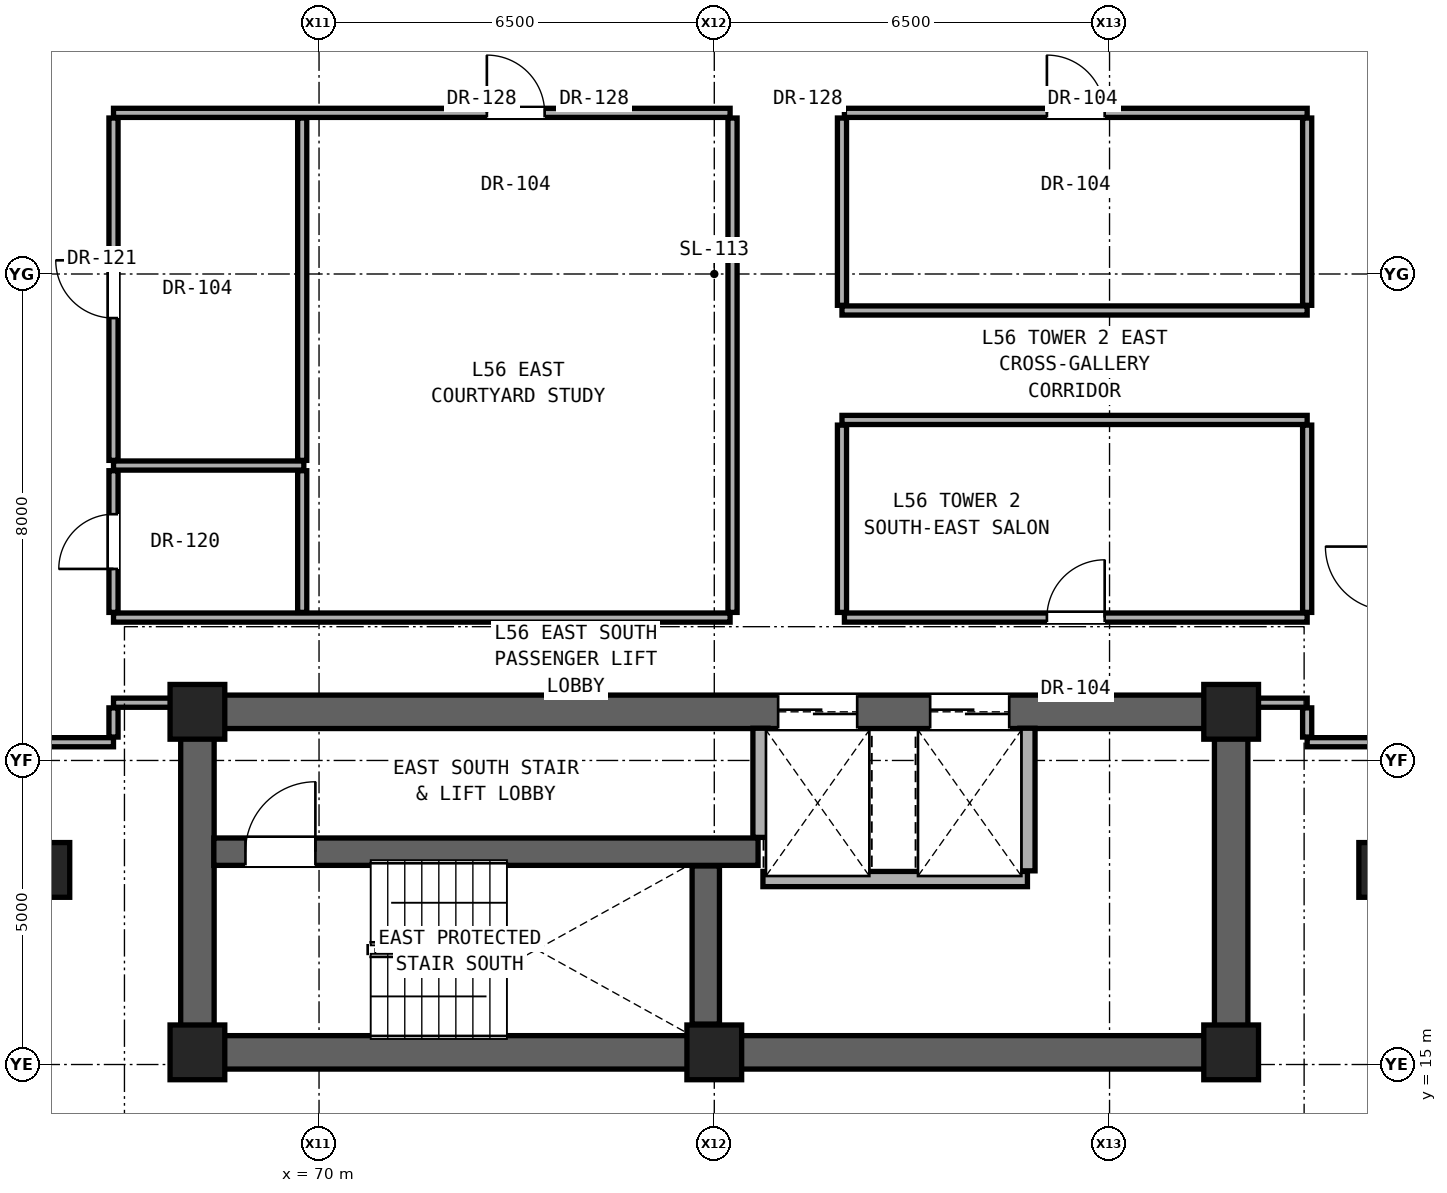
"""IFC4 building model, lengths in metres.
Left out: names, types, materials, properties, quantities, classifications, styles, units other than length and angle.
Written with IfcOpenShell. Run it as: python <this file> out.ifc"""

import sys

from ifc_helpers import new_model, si_unit, direction, frame, frame_2d, origin, origin_2d, place, context, subcontext, project, spatial, rectangle, extrude, element, fill, save


model = new_model("IFC4")
c1 = context("Model", 3, precision=1e-05, world=origin(), true_north=direction((0.0, 1.0)))
c2 = subcontext(c1, "Body", "Model", "MODEL_VIEW")
j1 = project(units=[si_unit("LENGTHUNIT", "METRE"), si_unit("PLANEANGLEUNIT", "RADIAN")], contexts=[c1])
p1 = place(None, origin())
s1 = spatial("IfcSite", under=j1, at=p1, CompositionType="ELEMENT")
p2 = place(p1, origin())
s2 = spatial("IfcBuilding", under=s1, at=p2, CompositionType="ELEMENT")
p3 = place(p2, frame((0.0, 0.0, 196.65)))
s3 = spatial("IfcBuildingStorey", under=s2, at=p3, CompositionType="ELEMENT", Elevation=196.65)
for number, where, z_axis, x_axis in (
    (1, (68.0, 15.2, 0.0), (0.0, 0.0, 1.0), (1.0, 0.0, 0.0)),
    (2, (76.5, 15.2, 0.0), (0.0, 0.0, 1.0), (1.0, 0.0, 0.0)),
    (3, (85.0, 15.2, 0.0), (0.0, 0.0, 1.0), (1.0, 0.0, 0.0)),
    (4, (68.0, 20.8, 0.0), (0.0, 0.0, 1.0), (1.0, 0.0, 0.0)),
    (5, (85.0, 20.8, 0.0), (0.0, 0.0, 1.0), (1.0, 0.0, 0.0)),
):
    element("IfcColumn", number, at=place(p3, frame(where, z_axis=z_axis, x_axis=x_axis)), inside=s3, PredefinedType="COLUMN", context=c2, shape_type="SweptSolid", body=[
        extrude(rectangle(XDim=0.9, YDim=0.9, at=origin_2d()), origin(), (0.0, 0.0, 1.0), 3.25),
    ])
for number, where, z_axis, x_axis in (
    (6, (65.6, 18.2, 0.0), (0.0, 0.0, 1.0), (1.0, 0.0, 0.0)),
    (7, (87.4, 18.2, 0.0), (0.0, 0.0, 1.0), (1.0, 0.0, 0.0)),
):
    element("IfcColumn", number, at=place(p3, frame(where, z_axis=z_axis, x_axis=x_axis)), inside=s3, PredefinedType="PILASTER", context=c2, shape_type="SweptSolid", body=[
        extrude(rectangle(XDim=0.6, YDim=0.9, at=origin_2d()), origin(), (0.0, 0.0, 1.0), 3.25),
    ])
p4 = place(p3, frame((68.0, 15.2, 0.0), z_axis=(0.0, 0.0, 1.0), x_axis=(1.0, 0.0, 0.0)))
e8 = element("IfcWall", 8, at=p4, inside=s3, PredefinedType="SHEAR", context=c2, shape_type="SweptSolid", body=[
    extrude(rectangle(XDim=17.0, YDim=0.55, at=frame_2d((8.5, 0.0))), origin(), (0.0, 0.0, 1.0), 3.05),
])
for number, where, z_axis, x_axis in (
    (9, (68.0, 15.2, 0.0), (0.0, 0.0, 1.0), (0.0, 1.0, 0.0)),
    (10, (85.0, 15.2, 0.0), (0.0, 0.0, 1.0), (0.0, 1.0, 0.0)),
):
    element("IfcWall", number, at=place(p3, frame(where, z_axis=z_axis, x_axis=x_axis)), inside=s3, PredefinedType="SHEAR", context=c2, shape_type="SweptSolid", body=[
        extrude(rectangle(XDim=5.6, YDim=0.55, at=frame_2d((2.8, 0.0))), origin(), (0.0, 0.0, 1.0), 3.05),
    ])
p5 = place(p3, frame((68.0, 20.8, 0.0), z_axis=(0.0, 0.0, 1.0), x_axis=(1.0, 0.0, 0.0)))
e11 = element("IfcWall", 11, at=p5, inside=s3, PredefinedType="SHEAR", context=c2, shape_type="SweptSolid", body=[
    extrude(rectangle(XDim=17.0, YDim=0.55, at=frame_2d((8.5, 0.0))), origin(), (0.0, 0.0, 1.0), 3.05),
])
p6 = place(p5, frame((9.55, 0.0, 0.0)))
e12 = element("IfcOpeningElement", 12, at=p6, cuts=e11, PredefinedType="OPENING", context=c2, shape_type="SweptSolid", body=[
    extrude(rectangle(XDim=1.3, YDim=2.3, at=frame_2d((0.65, 1.15))), frame((0.0, 0.285, 0.0), z_axis=(0.0, -1.0, 0.0), x_axis=(1.0, 0.0, 0.0)), (0.0, 0.0, 1.0), 0.57),
])
p7 = place(p5, frame((12.05, 0.0, 0.0)))
e13 = element("IfcOpeningElement", 13, at=p7, cuts=e11, PredefinedType="OPENING", context=c2, shape_type="SweptSolid", body=[
    extrude(rectangle(XDim=1.3, YDim=2.3, at=frame_2d((0.65, 1.15))), frame((0.0, 0.285, 0.0), z_axis=(0.0, -1.0, 0.0), x_axis=(1.0, 0.0, 0.0)), (0.0, 0.0, 1.0), 0.57),
])
p8 = place(p3, frame((77.3, 18.05, 0.0), z_axis=(0.0, 0.0, 1.0), x_axis=(1.0, 0.0, 0.0)))
e14 = element("IfcWall", 14, at=p8, inside=s3, PredefinedType="SOLIDWALL", context=c2, shape_type="SweptSolid", body=[
    extrude(rectangle(XDim=4.35, YDim=0.25, at=frame_2d((2.175, 0.0))), origin(), (0.0, 0.0, 1.0), 3.05),
])
p9 = place(p3, frame((68.27, 18.5, 0.0), z_axis=(0.0, 0.0, 1.0), x_axis=(1.0, 0.0, 0.0)))
e15 = element("IfcWall", 15, at=p9, inside=s3, PredefinedType="SHEAR", context=c2, shape_type="SweptSolid", body=[
    extrude(rectangle(XDim=8.95, YDim=0.45, at=frame_2d((4.475, 0.0))), origin(), (0.0, 0.0, 1.0), 3.05),
])
p10 = place(p9, frame((0.52, 0.0, 0.0)))
e16 = element("IfcOpeningElement", 16, at=p10, cuts=e15, PredefinedType="OPENING", context=c2, shape_type="SweptSolid", body=[
    extrude(rectangle(XDim=1.15, YDim=2.2, at=frame_2d((0.575, 1.1))), frame((0.0, 0.235, 0.0), z_axis=(0.0, -1.0, 0.0), x_axis=(1.0, 0.0, 0.0)), (0.0, 0.0, 1.0), 0.47),
])
p11 = place(p3, frame((65.25, 20.3, 0.0), z_axis=(0.0, 0.0, 1.0), x_axis=(1.0, 0.0, 0.0)))
e17 = element("IfcWall", 17, at=p11, inside=s3, PredefinedType="PARTITIONING", context=c2, shape_type="SweptSolid", body=[
    extrude(rectangle(XDim=1.37, YDim=0.15, at=frame_2d((0.685, 0.0))), origin(), (0.0, 0.0, 1.0), 3.05),
])
p12 = place(p3, frame((86.25, 20.3, 0.0), z_axis=(0.0, 0.0, 1.0), x_axis=(1.0, 0.0, 0.0)))
e18 = element("IfcWall", 18, at=p12, inside=s3, PredefinedType="PARTITIONING", context=c2, shape_type="SweptSolid", body=[
    extrude(rectangle(XDim=1.35, YDim=0.15, at=frame_2d((0.675, 0.0))), origin(), (0.0, 0.0, 1.0), 3.05),
])
p13 = place(p3, frame((66.62, 20.95, 0.0), z_axis=(0.0, 0.0, 1.0), x_axis=(1.0, 0.0, 0.0)))
e19 = element("IfcWall", 19, at=p13, inside=s3, PredefinedType="PARTITIONING", context=c2, shape_type="SweptSolid", body=[
    extrude(rectangle(XDim=1.11, YDim=0.15, at=frame_2d((0.555, 0.0))), origin(), (0.0, 0.0, 1.0), 2.442),
])
p14 = place(p3, frame((85.27, 20.95, 0.0), z_axis=(0.0, 0.0, 1.0), x_axis=(1.0, 0.0, 0.0)))
e20 = element("IfcWall", 20, at=p14, inside=s3, PredefinedType="PARTITIONING", context=c2, shape_type="SweptSolid", body=[
    extrude(rectangle(XDim=0.98, YDim=0.15, at=frame_2d((0.49, 0.0))), origin(), (0.0, 0.0, 1.0), 2.442),
])
p15 = place(p3, frame((66.62, 22.35, 0.0), z_axis=(0.0, 0.0, 1.0), x_axis=(1.0, 0.0, 0.0)))
e21 = element("IfcWall", 21, at=p15, inside=s3, PredefinedType="PARTITIONING", context=c2, shape_type="SweptSolid", body=[
    extrude(rectangle(XDim=10.14, YDim=0.15, at=frame_2d((5.07, 0.0))), origin(), (0.0, 0.0, 1.0), 2.186),
])
p16 = place(p3, frame((78.64, 22.35, 0.0), z_axis=(0.0, 0.0, 1.0), x_axis=(1.0, 0.0, 0.0)))
e22 = element("IfcWall", 22, at=p16, inside=s3, PredefinedType="PARTITIONING", context=c2, shape_type="SweptSolid", body=[
    extrude(rectangle(XDim=7.61, YDim=0.15, at=frame_2d((3.805, 0.0))), origin(), (0.0, 0.0, 1.0), 2.186),
])
p17 = place(p16, frame((3.33, 0.0, 0.0)))
e23 = element("IfcOpeningElement", 23, at=p17, cuts=e22, PredefinedType="OPENING", context=c2, shape_type="SweptSolid", body=[
    extrude(rectangle(XDim=0.95, YDim=2.15, at=frame_2d((0.475, 1.075))), frame((0.0, 0.085, 0.0), z_axis=(0.0, -1.0, 0.0), x_axis=(1.0, 0.0, 0.0)), (0.0, 0.0, 1.0), 0.17),
])
p18 = place(p3, frame((66.62, 24.85, 0.0), z_axis=(0.0, 0.0, 1.0), x_axis=(1.0, 0.0, 0.0)))
e24 = element("IfcWall", 24, at=p18, inside=s3, PredefinedType="PARTITIONING", context=c2, shape_type="SweptSolid", body=[
    extrude(rectangle(XDim=3.13, YDim=0.15, at=frame_2d((1.565, 0.0))), origin(), (0.0, 0.0, 1.0), 2.186),
])
for number, where, z_axis, x_axis in (
    (25, (78.6, 25.6, 0.0), (0.0, 0.0, 1.0), (1.0, 0.0, 0.0)),
    (26, (78.6, 27.4, 0.0), (0.0, 0.0, 1.0), (1.0, 0.0, 0.0)),
):
    element("IfcWall", number, at=place(p3, frame(where, z_axis=z_axis, x_axis=x_axis)), inside=s3, PredefinedType="PARTITIONING", context=c2, shape_type="SweptSolid", body=[
        extrude(rectangle(XDim=7.65, YDim=0.15, at=frame_2d((3.825, 0.0))), origin(), (0.0, 0.0, 1.0), 2.186),
    ])
p19 = place(p3, frame((66.62, 30.65, 0.0), z_axis=(0.0, 0.0, 1.0), x_axis=(1.0, 0.0, 0.0)))
e27 = element("IfcWall", 27, at=p19, inside=s3, PredefinedType="PARTITIONING", context=c2, shape_type="SweptSolid", body=[
    extrude(rectangle(XDim=10.14, YDim=0.15, at=frame_2d((5.07, 0.0))), origin(), (0.0, 0.0, 1.0), 2.186),
])
p20 = place(p19, frame((6.14, 0.0, 0.0)))
e28 = element("IfcOpeningElement", 28, at=p20, cuts=e27, PredefinedType="OPENING", context=c2, shape_type="SweptSolid", body=[
    extrude(rectangle(XDim=0.95, YDim=2.15, at=frame_2d((0.475, 1.075))), frame((0.0, 0.085, 0.0), z_axis=(0.0, -1.0, 0.0), x_axis=(1.0, 0.0, 0.0)), (0.0, 0.0, 1.0), 0.17),
])
p21 = place(p3, frame((78.64, 30.65, 0.0), z_axis=(0.0, 0.0, 1.0), x_axis=(1.0, 0.0, 0.0)))
e29 = element("IfcWall", 29, at=p21, inside=s3, PredefinedType="PARTITIONING", context=c2, shape_type="SweptSolid", body=[
    extrude(rectangle(XDim=7.61, YDim=0.15, at=frame_2d((3.805, 0.0))), origin(), (0.0, 0.0, 1.0), 2.186),
])
p22 = place(p21, frame((3.33, 0.0, 0.0)))
e30 = element("IfcOpeningElement", 30, at=p22, cuts=e29, PredefinedType="OPENING", context=c2, shape_type="SweptSolid", body=[
    extrude(rectangle(XDim=0.95, YDim=2.15, at=frame_2d((0.475, 1.075))), frame((0.0, 0.085, 0.0), z_axis=(0.0, -1.0, 0.0), x_axis=(1.0, 0.0, 0.0)), (0.0, 0.0, 1.0), 0.17),
])
p23 = place(p3, frame((66.62, 20.385, 0.0), z_axis=(0.0, 0.0, 1.0), x_axis=(0.0, 1.0, 0.0)))
e31 = element("IfcWall", 31, at=p23, inside=s3, PredefinedType="PARTITIONING", context=c2, shape_type="SweptSolid", body=[
    extrude(rectangle(XDim=0.48, YDim=0.15, at=frame_2d((0.24, 0.0))), origin(), (0.0, 0.0, 1.0), 2.442),
])
p24 = place(p3, frame((66.62, 22.435, 0.0), z_axis=(0.0, 0.0, 1.0), x_axis=(0.0, 1.0, 0.0)))
e32 = element("IfcWall", 32, at=p24, inside=s3, PredefinedType="PARTITIONING", context=c2, shape_type="SweptSolid", body=[
    extrude(rectangle(XDim=2.33, YDim=0.15, at=frame_2d((1.165, 0.0))), origin(), (0.0, 0.0, 1.0), 3.05),
])
p25 = place(p24, frame((0.715, 0.0, 0.0)))
e33 = element("IfcOpeningElement", 33, at=p25, cuts=e32, PredefinedType="OPENING", context=c2, shape_type="SweptSolid", body=[
    extrude(rectangle(XDim=0.9, YDim=2.1, at=frame_2d((0.45, 1.05))), frame((0.0, 0.085, 0.0), z_axis=(0.0, -1.0, 0.0), x_axis=(1.0, 0.0, 0.0)), (0.0, 0.0, 1.0), 0.17),
])
p26 = place(p3, frame((66.62, 24.935, 0.0), z_axis=(0.0, 0.0, 1.0), x_axis=(0.0, 1.0, 0.0)))
e34 = element("IfcWall", 34, at=p26, inside=s3, PredefinedType="PARTITIONING", context=c2, shape_type="SweptSolid", body=[
    extrude(rectangle(XDim=5.63, YDim=0.15, at=frame_2d((2.815, 0.0))), origin(), (0.0, 0.0, 1.0), 2.346),
])
p27 = place(p26, frame((2.34, 0.0, 0.0)))
e35 = element("IfcOpeningElement", 35, at=p27, cuts=e34, PredefinedType="OPENING", context=c2, shape_type="SweptSolid", body=[
    extrude(rectangle(XDim=0.95, YDim=2.15, at=frame_2d((0.475, 1.075))), frame((0.0, 0.085, 0.0), z_axis=(0.0, -1.0, 0.0), x_axis=(1.0, 0.0, 0.0)), (0.0, 0.0, 1.0), 0.17),
])
p28 = place(p3, frame((69.723, 22.435, 0.0), z_axis=(0.0, 0.0, 1.0), x_axis=(0.0, 1.0, 0.0)))
e36 = element("IfcWall", 36, at=p28, inside=s3, PredefinedType="PARTITIONING", context=c2, shape_type="SweptSolid", body=[
    extrude(rectangle(XDim=2.33, YDim=0.15, at=frame_2d((1.165, 0.0))), origin(), (0.0, 0.0, 1.0), 3.05),
])
p29 = place(p3, frame((69.723, 24.935, 0.0), z_axis=(0.0, 0.0, 1.0), x_axis=(0.0, 1.0, 0.0)))
e37 = element("IfcWall", 37, at=p29, inside=s3, PredefinedType="PARTITIONING", context=c2, shape_type="SweptSolid", body=[
    extrude(rectangle(XDim=5.63, YDim=0.15, at=frame_2d((2.815, 0.0))), origin(), (0.0, 0.0, 1.0), 2.186),
])
p30 = place(p3, frame((76.36, 15.665, 0.0), z_axis=(0.0, 0.0, 1.0), x_axis=(0.0, 1.0, 0.0)))
e38 = element("IfcWall", 38, at=p30, inside=s3, PredefinedType="SHEAR", context=c2, shape_type="SweptSolid", body=[
    extrude(rectangle(XDim=2.6, YDim=0.45, at=frame_2d((1.3, 0.0))), origin(), (0.0, 0.0, 1.0), 3.05),
])
p31 = place(p3, frame((76.8, 22.435, 0.0), z_axis=(0.0, 0.0, 1.0), x_axis=(0.0, 1.0, 0.0)))
e39 = element("IfcWall", 39, at=p31, inside=s3, PredefinedType="PARTITIONING", context=c2, shape_type="SweptSolid", body=[
    extrude(rectangle(XDim=8.13, YDim=0.15, at=frame_2d((4.065, 0.0))), origin(), (0.0, 0.0, 1.0), 2.186),
])
p32 = place(p3, frame((77.26, 18.735, 0.0), z_axis=(0.0, 0.0, 1.0), x_axis=(0.0, 1.0, 0.0)))
e40 = element("IfcWall", 40, at=p32, inside=s3, PredefinedType="SOLIDWALL", context=c2, shape_type="SweptSolid", body=[
    extrude(rectangle(XDim=1.795, YDim=0.25, at=frame_2d((0.897, 0.0))), origin(), (0.0, 0.0, 1.0), 3.05),
])
p33 = place(p3, frame((78.6, 22.435, 0.0), z_axis=(0.0, 0.0, 1.0), x_axis=(0.0, 1.0, 0.0)))
e41 = element("IfcWall", 41, at=p33, inside=s3, PredefinedType="PARTITIONING", context=c2, shape_type="SweptSolid", body=[
    extrude(rectangle(XDim=3.08, YDim=0.15, at=frame_2d((1.54, 0.0))), origin(), (0.0, 0.0, 1.0), 3.05),
])
p34 = place(p3, frame((78.6, 27.485, 0.0), z_axis=(0.0, 0.0, 1.0), x_axis=(0.0, 1.0, 0.0)))
e42 = element("IfcWall", 42, at=p34, inside=s3, PredefinedType="PARTITIONING", context=c2, shape_type="SweptSolid", body=[
    extrude(rectangle(XDim=3.08, YDim=0.15, at=frame_2d((1.54, 0.0))), origin(), (0.0, 0.0, 1.0), 2.186),
])
p35 = place(p3, frame((81.65, 18.185, 0.0), z_axis=(0.0, 0.0, 1.0), x_axis=(0.0, 1.0, 0.0)))
e43 = element("IfcWall", 43, at=p35, inside=s3, PredefinedType="SOLIDWALL", context=c2, shape_type="SweptSolid", body=[
    extrude(rectangle(XDim=2.345, YDim=0.25, at=frame_2d((1.172, 0.0))), origin(), (0.0, 0.0, 1.0), 3.05),
])
p36 = place(p3, frame((86.25, 20.385, 0.0), z_axis=(0.0, 0.0, 1.0), x_axis=(0.0, 1.0, 0.0)))
e44 = element("IfcWall", 44, at=p36, inside=s3, PredefinedType="PARTITIONING", context=c2, shape_type="SweptSolid", body=[
    extrude(rectangle(XDim=0.48, YDim=0.15, at=frame_2d((0.24, 0.0))), origin(), (0.0, 0.0, 1.0), 2.442),
])
p37 = place(p3, frame((86.25, 22.435, 0.0), z_axis=(0.0, 0.0, 1.0), x_axis=(0.0, 1.0, 0.0)))
e45 = element("IfcWall", 45, at=p37, inside=s3, PredefinedType="PARTITIONING", context=c2, shape_type="SweptSolid", body=[
    extrude(rectangle(XDim=3.08, YDim=0.15, at=frame_2d((1.54, 0.0))), origin(), (0.0, 0.0, 1.0), 3.05),
])
p38 = place(p3, frame((86.25, 27.485, 0.0), z_axis=(0.0, 0.0, 1.0), x_axis=(0.0, 1.0, 0.0)))
e46 = element("IfcWall", 46, at=p38, inside=s3, PredefinedType="PARTITIONING", context=c2, shape_type="SweptSolid", body=[
    extrude(rectangle(XDim=3.08, YDim=0.15, at=frame_2d((1.54, 0.0))), origin(), (0.0, 0.0, 1.0), 2.346),
])
p39 = place(p10, origin())
e47 = element("IfcDoor", 47, at=p39, inside=s3, OperationType="SINGLE_SWING_RIGHT", PredefinedType="DOOR", context=c2, shape_type="SweptSolid", body=[
    extrude(rectangle(XDim=1.15, YDim=2.2, at=frame_2d((0.575, 1.1))), frame((0.0, 0.025, 0.0), z_axis=(0.0, -1.0, 0.0), x_axis=(1.0, 0.0, 0.0)), (0.0, 0.0, 1.0), 0.05),
])
fill(e16, e47)
p40 = place(p25, origin())
e48 = element("IfcDoor", 48, at=p40, inside=s3, OperationType="SINGLE_SWING_LEFT", PredefinedType="DOOR", context=c2, shape_type="SweptSolid", body=[
    extrude(rectangle(XDim=0.9, YDim=2.1, at=frame_2d((0.45, 1.05))), frame((0.0, 0.025, 0.0), z_axis=(0.0, -1.0, 0.0), x_axis=(1.0, 0.0, 0.0)), (0.0, 0.0, 1.0), 0.05),
])
fill(e33, e48)
p41 = place(p27, origin())
e49 = element("IfcDoor", 49, at=p41, inside=s3, OperationType="SINGLE_SWING_RIGHT", PredefinedType="DOOR", context=c2, shape_type="SweptSolid", body=[
    extrude(rectangle(XDim=0.95, YDim=2.15, at=frame_2d((0.475, 1.075))), frame((0.0, 0.025, 0.0), z_axis=(0.0, -1.0, 0.0), x_axis=(1.0, 0.0, 0.0)), (0.0, 0.0, 1.0), 0.05),
])
fill(e35, e49)
p42 = place(p20, origin())
e50 = element("IfcDoor", 50, at=p42, inside=s3, OperationType="SINGLE_SWING_LEFT", PredefinedType="DOOR", context=c2, shape_type="SweptSolid", body=[
    extrude(rectangle(XDim=0.95, YDim=2.15, at=frame_2d((0.475, 1.075))), frame((0.0, 0.025, 0.0), z_axis=(0.0, -1.0, 0.0), x_axis=(1.0, 0.0, 0.0)), (0.0, 0.0, 1.0), 0.05),
])
fill(e28, e50)
p43 = place(p17, origin())
e51 = element("IfcDoor", 51, at=p43, inside=s3, OperationType="SINGLE_SWING_RIGHT", PredefinedType="DOOR", context=c2, shape_type="SweptSolid", body=[
    extrude(rectangle(XDim=0.95, YDim=2.15, at=frame_2d((0.475, 1.075))), frame((0.0, 0.025, 0.0), z_axis=(0.0, -1.0, 0.0), x_axis=(1.0, 0.0, 0.0)), (0.0, 0.0, 1.0), 0.05),
])
fill(e23, e51)
p44 = place(p22, origin())
e52 = element("IfcDoor", 52, at=p44, inside=s3, OperationType="SINGLE_SWING_LEFT", PredefinedType="DOOR", context=c2, shape_type="SweptSolid", body=[
    extrude(rectangle(XDim=0.95, YDim=2.15, at=frame_2d((0.475, 1.075))), frame((0.0, 0.025, 0.0), z_axis=(0.0, -1.0, 0.0), x_axis=(1.0, 0.0, 0.0)), (0.0, 0.0, 1.0), 0.05),
])
fill(e30, e52)
p45 = place(p6, origin())
e53 = element("IfcDoor", 53, at=p45, inside=s3, OperationType="DOUBLE_DOOR_SLIDING", PredefinedType="DOOR", context=c2, shape_type="SweptSolid", body=[
    extrude(rectangle(XDim=1.3, YDim=2.3, at=frame_2d((0.65, 1.15))), frame((0.0, 0.025, 0.0), z_axis=(0.0, -1.0, 0.0), x_axis=(1.0, 0.0, 0.0)), (0.0, 0.0, 1.0), 0.05),
])
fill(e12, e53)
p46 = place(p7, origin())
e54 = element("IfcDoor", 54, at=p46, inside=s3, OperationType="DOUBLE_DOOR_SLIDING", PredefinedType="DOOR", context=c2, shape_type="SweptSolid", body=[
    extrude(rectangle(XDim=1.3, YDim=2.3, at=frame_2d((0.65, 1.15))), frame((0.0, 0.025, 0.0), z_axis=(0.0, -1.0, 0.0), x_axis=(1.0, 0.0, 0.0)), (0.0, 0.0, 1.0), 0.05),
])
fill(e13, e54)
save(model, sys.argv[1])
